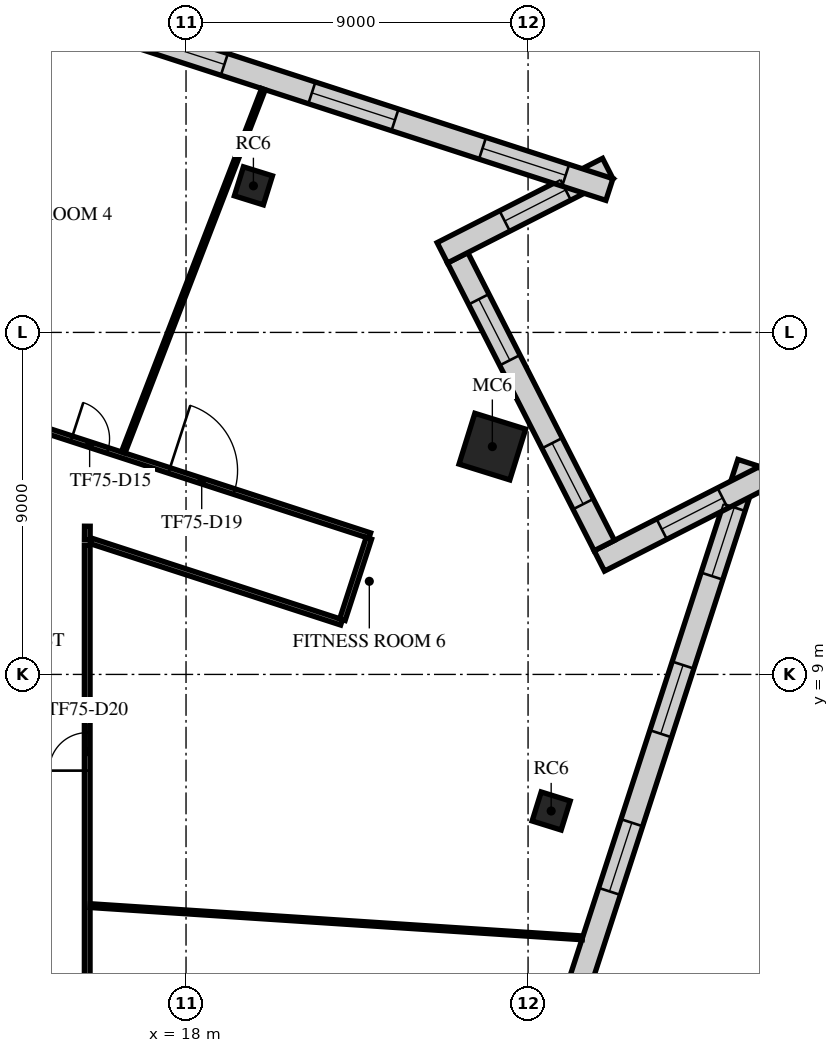
"""IFC4 building model, lengths in metres.
Left out: names, types, materials, properties, quantities, classifications, styles, units other than length and angle.
Written with IfcOpenShell. Run it as: python <this file> out.ifc"""

import sys

from ifc_helpers import new_model, si_unit, direction, frame, frame_2d, origin, origin_2d, place, context, subcontext, project, spatial, rectangle, extrude, element, fill, save


model = new_model("IFC4")
c1 = context("Model", 3, precision=1e-05, world=origin(), true_north=direction((0.0, 1.0)))
c2 = subcontext(c1, "Body", "Model", "MODEL_VIEW")
j1 = project(units=[si_unit("LENGTHUNIT", "METRE"), si_unit("PLANEANGLEUNIT", "RADIAN")], contexts=[c1])
p1 = place(None, origin())
s1 = spatial("IfcSite", under=j1, at=p1, CompositionType="ELEMENT")
p2 = place(p1, origin())
s2 = spatial("IfcBuilding", under=s1, at=p2, CompositionType="ELEMENT")
p3 = place(p2, frame((0.0, 0.0, 316.5)))
s3 = spatial("IfcBuildingStorey", under=s2, at=p3, CompositionType="ELEMENT", Elevation=316.5)
p4 = place(p3, frame((27.608, 5.406, 0.0), z_axis=(0.0, 0.0, 1.0), x_axis=(0.297503182032, 0.954720826567, 0.0)))
e1 = element("IfcColumn", 1, at=p4, inside=s3, PredefinedType="COLUMN", context=c2, shape_type="SweptSolid", body=[
    extrude(rectangle(XDim=0.8, YDim=0.8, at=origin_2d()), origin(), (0.0, 0.0, 1.0), 4.0),
])
p5 = place(p3, frame((26.06, 14.995, 0.0), z_axis=(0.0, 0.0, 1.0), x_axis=(0.297503182032, 0.954720826567, 0.0)))
e2 = element("IfcColumn", 2, at=p5, inside=s3, PredefinedType="COLUMN", context=c2, shape_type="SweptSolid", body=[
    extrude(rectangle(XDim=1.4, YDim=1.4, at=origin_2d()), origin(), (0.0, 0.0, 1.0), 4.0),
])
p6 = place(p3, frame((19.773, 21.857, 0.0), z_axis=(0.0, 0.0, 1.0), x_axis=(0.297503182032, 0.954720826567, 0.0)))
e3 = element("IfcColumn", 3, at=p6, inside=s3, PredefinedType="COLUMN", context=c2, shape_type="SweptSolid", body=[
    extrude(rectangle(XDim=0.8, YDim=0.8, at=origin_2d()), origin(), (0.0, 0.0, 1.0), 4.0),
])
p7 = place(p3, frame((17.98, -31.066, 0.0), z_axis=(0.0, 0.0, 1.0), x_axis=(0.30901795675, 0.9510562036, 0.0)))
e4 = element("IfcWall", 4, at=p7, inside=s3, PredefinedType="STANDARD", context=c2, shape_type="SweptSolid", body=[
    extrude(rectangle(XDim=47.979, YDim=0.6, at=frame_2d((23.99, 0.0))), origin(), (0.0, 0.0, 1.0), 3.65),
])
p8 = place(p7, frame((1.231, 0.0, 0.9)))
e5 = element("IfcOpeningElement", 5, at=p8, cuts=e4, PredefinedType="OPENING", context=c2, shape_type="SweptSolid", body=[
    extrude(rectangle(XDim=1.9, YDim=2.1, at=frame_2d((0.95, 1.05))), frame((0.0, 0.31, 0.0), z_axis=(0.0, -1.0, 0.0), x_axis=(1.0, 0.0, 0.0)), (0.0, 0.0, 1.0), 0.62),
])
p9 = place(p7, frame((5.593, 0.0, 0.9)))
e6 = element("IfcOpeningElement", 6, at=p9, cuts=e4, PredefinedType="OPENING", context=c2, shape_type="SweptSolid", body=[
    extrude(rectangle(XDim=1.9, YDim=2.1, at=frame_2d((0.95, 1.05))), frame((0.0, 0.31, 0.0), z_axis=(0.0, -1.0, 0.0), x_axis=(1.0, 0.0, 0.0)), (0.0, 0.0, 1.0), 0.62),
])
p10 = place(p7, frame((9.954, 0.0, 0.9)))
e7 = element("IfcOpeningElement", 7, at=p10, cuts=e4, PredefinedType="OPENING", context=c2, shape_type="SweptSolid", body=[
    extrude(rectangle(XDim=1.9, YDim=2.1, at=frame_2d((0.95, 1.05))), frame((0.0, 0.31, 0.0), z_axis=(0.0, -1.0, 0.0), x_axis=(1.0, 0.0, 0.0)), (0.0, 0.0, 1.0), 0.62),
])
p11 = place(p7, frame((14.316, 0.0, 0.9)))
e8 = element("IfcOpeningElement", 8, at=p11, cuts=e4, PredefinedType="OPENING", context=c2, shape_type="SweptSolid", body=[
    extrude(rectangle(XDim=1.9, YDim=2.1, at=frame_2d((0.95, 1.05))), frame((0.0, 0.31, 0.0), z_axis=(0.0, -1.0, 0.0), x_axis=(1.0, 0.0, 0.0)), (0.0, 0.0, 1.0), 0.62),
])
p12 = place(p7, frame((18.678, 0.0, 0.9)))
e9 = element("IfcOpeningElement", 9, at=p12, cuts=e4, PredefinedType="OPENING", context=c2, shape_type="SweptSolid", body=[
    extrude(rectangle(XDim=1.9, YDim=2.1, at=frame_2d((0.95, 1.05))), frame((0.0, 0.31, 0.0), z_axis=(0.0, -1.0, 0.0), x_axis=(1.0, 0.0, 0.0)), (0.0, 0.0, 1.0), 0.62),
])
p13 = place(p7, frame((23.04, 0.0, 0.9)))
e10 = element("IfcOpeningElement", 10, at=p13, cuts=e4, PredefinedType="OPENING", context=c2, shape_type="SweptSolid", body=[
    extrude(rectangle(XDim=1.9, YDim=2.1, at=frame_2d((0.95, 1.05))), frame((0.0, 0.31, 0.0), z_axis=(0.0, -1.0, 0.0), x_axis=(1.0, 0.0, 0.0)), (0.0, 0.0, 1.0), 0.62),
])
p14 = place(p7, frame((27.401, 0.0, 0.9)))
e11 = element("IfcOpeningElement", 11, at=p14, cuts=e4, PredefinedType="OPENING", context=c2, shape_type="SweptSolid", body=[
    extrude(rectangle(XDim=1.9, YDim=2.1, at=frame_2d((0.95, 1.05))), frame((0.0, 0.31, 0.0), z_axis=(0.0, -1.0, 0.0), x_axis=(1.0, 0.0, 0.0)), (0.0, 0.0, 1.0), 0.62),
])
p15 = place(p7, frame((31.763, 0.0, 0.9)))
e12 = element("IfcOpeningElement", 12, at=p15, cuts=e4, PredefinedType="OPENING", context=c2, shape_type="SweptSolid", body=[
    extrude(rectangle(XDim=1.9, YDim=2.1, at=frame_2d((0.95, 1.05))), frame((0.0, 0.31, 0.0), z_axis=(0.0, -1.0, 0.0), x_axis=(1.0, 0.0, 0.0)), (0.0, 0.0, 1.0), 0.62),
])
p16 = place(p7, frame((36.125, 0.0, 0.9)))
e13 = element("IfcOpeningElement", 13, at=p16, cuts=e4, PredefinedType="OPENING", context=c2, shape_type="SweptSolid", body=[
    extrude(rectangle(XDim=1.9, YDim=2.1, at=frame_2d((0.95, 1.05))), frame((0.0, 0.31, 0.0), z_axis=(0.0, -1.0, 0.0), x_axis=(1.0, 0.0, 0.0)), (0.0, 0.0, 1.0), 0.62),
])
p17 = place(p7, frame((40.487, 0.0, 0.9)))
e14 = element("IfcOpeningElement", 14, at=p17, cuts=e4, PredefinedType="OPENING", context=c2, shape_type="SweptSolid", body=[
    extrude(rectangle(XDim=1.9, YDim=2.1, at=frame_2d((0.95, 1.05))), frame((0.0, 0.31, 0.0), z_axis=(0.0, -1.0, 0.0), x_axis=(1.0, 0.0, 0.0)), (0.0, 0.0, 1.0), 0.62),
])
p18 = place(p7, frame((44.848, 0.0, 0.9)))
e15 = element("IfcOpeningElement", 15, at=p18, cuts=e4, PredefinedType="OPENING", context=c2, shape_type="SweptSolid", body=[
    extrude(rectangle(XDim=1.9, YDim=2.1, at=frame_2d((0.95, 1.05))), frame((0.0, 0.31, 0.0), z_axis=(0.0, -1.0, 0.0), x_axis=(1.0, 0.0, 0.0)), (0.0, 0.0, 1.0), 0.62),
])
p19 = place(p3, frame((33.228, 14.205, 0.0), z_axis=(0.0, 0.0, 1.0), x_axis=(-0.891013179829, -0.453977437073, 0.0)))
e16 = element("IfcWall", 16, at=p19, inside=s3, PredefinedType="STANDARD", context=c2, shape_type="SweptSolid", body=[
    extrude(rectangle(XDim=4.885, YDim=0.6, at=frame_2d((2.443, 0.0))), origin(), (0.0, 0.0, 1.0), 3.65),
])
p20 = place(p19, frame((1.243, 0.0, 0.9)))
e17 = element("IfcOpeningElement", 17, at=p20, cuts=e16, PredefinedType="OPENING", context=c2, shape_type="SweptSolid", body=[
    extrude(rectangle(XDim=1.8, YDim=2.1, at=frame_2d((0.9, 1.05))), frame((0.0, 0.31, 0.0), z_axis=(0.0, -1.0, 0.0), x_axis=(1.0, 0.0, 0.0)), (0.0, 0.0, 1.0), 0.62),
])
p21 = place(p3, frame((29.006, 12.39, 0.0), z_axis=(0.0, 0.0, 1.0), x_axis=(-0.453979132966, 0.891012315758, 0.0)))
e18 = element("IfcWall", 18, at=p21, inside=s3, PredefinedType="STANDARD", context=c2, shape_type="SweptSolid", body=[
    extrude(rectangle(XDim=8.5, YDim=0.6, at=frame_2d((4.25, 0.0))), origin(), (0.0, 0.0, 1.0), 3.65),
])
p22 = place(p21, frame((1.225, 0.0, 0.9)))
e19 = element("IfcOpeningElement", 19, at=p22, cuts=e18, PredefinedType="OPENING", context=c2, shape_type="SweptSolid", body=[
    extrude(rectangle(XDim=1.8, YDim=2.1, at=frame_2d((0.9, 1.05))), frame((0.0, 0.31, 0.0), z_axis=(0.0, -1.0, 0.0), x_axis=(1.0, 0.0, 0.0)), (0.0, 0.0, 1.0), 0.62),
])
p23 = place(p21, frame((5.475, 0.0, 0.9)))
e20 = element("IfcOpeningElement", 20, at=p23, cuts=e18, PredefinedType="OPENING", context=c2, shape_type="SweptSolid", body=[
    extrude(rectangle(XDim=1.8, YDim=2.1, at=frame_2d((0.9, 1.05))), frame((0.0, 0.31, 0.0), z_axis=(0.0, -1.0, 0.0), x_axis=(1.0, 0.0, 0.0)), (0.0, 0.0, 1.0), 0.62),
])
p24 = place(p3, frame((24.744, 20.095, 0.0), z_axis=(0.0, 0.0, 1.0), x_axis=(0.891003264926, 0.453996896346, 0.0)))
e21 = element("IfcWall", 21, at=p24, inside=s3, PredefinedType="STANDARD", context=c2, shape_type="SweptSolid", body=[
    extrude(rectangle(XDim=4.885, YDim=0.6, at=frame_2d((2.443, 0.0))), origin(), (0.0, 0.0, 1.0), 3.65),
])
p25 = place(p24, frame((1.843, 0.0, 0.9)))
e22 = element("IfcOpeningElement", 22, at=p25, cuts=e21, PredefinedType="OPENING", context=c2, shape_type="SweptSolid", body=[
    extrude(rectangle(XDim=1.8, YDim=2.1, at=frame_2d((0.9, 1.05))), frame((0.0, 0.31, 0.0), z_axis=(0.0, -1.0, 0.0), x_axis=(1.0, 0.0, 0.0)), (0.0, 0.0, 1.0), 0.62),
])
p26 = place(p3, frame((29.14, 21.76, 0.0), z_axis=(0.0, 0.0, 1.0), x_axis=(-0.951057712071, 0.309013314132, 0.0)))
e23 = element("IfcWall", 23, at=p26, inside=s3, PredefinedType="STANDARD", context=c2, shape_type="SweptSolid", body=[
    extrude(rectangle(XDim=42.49, YDim=0.6, at=frame_2d((21.245, 0.0))), origin(), (0.0, 0.0, 1.0), 3.65),
])
p27 = place(p26, frame((1.21, 0.0, 0.9)))
e24 = element("IfcOpeningElement", 24, at=p27, cuts=e23, PredefinedType="OPENING", context=c2, shape_type="SweptSolid", body=[
    extrude(rectangle(XDim=2.3, YDim=2.1, at=frame_2d((1.15, 1.05))), frame((0.0, 0.31, 0.0), z_axis=(0.0, -1.0, 0.0), x_axis=(1.0, 0.0, 0.0)), (0.0, 0.0, 1.0), 0.62),
])
p28 = place(p26, frame((5.932, 0.0, 0.9)))
e25 = element("IfcOpeningElement", 25, at=p28, cuts=e23, PredefinedType="OPENING", context=c2, shape_type="SweptSolid", body=[
    extrude(rectangle(XDim=2.3, YDim=2.1, at=frame_2d((1.15, 1.05))), frame((0.0, 0.31, 0.0), z_axis=(0.0, -1.0, 0.0), x_axis=(1.0, 0.0, 0.0)), (0.0, 0.0, 1.0), 0.62),
])
p29 = place(p26, frame((10.653, 0.0, 0.9)))
e26 = element("IfcOpeningElement", 26, at=p29, cuts=e23, PredefinedType="OPENING", context=c2, shape_type="SweptSolid", body=[
    extrude(rectangle(XDim=2.3, YDim=2.1, at=frame_2d((1.15, 1.05))), frame((0.0, 0.31, 0.0), z_axis=(0.0, -1.0, 0.0), x_axis=(1.0, 0.0, 0.0)), (0.0, 0.0, 1.0), 0.62),
])
p30 = place(p26, frame((15.374, 0.0, 0.9)))
e27 = element("IfcOpeningElement", 27, at=p30, cuts=e23, PredefinedType="OPENING", context=c2, shape_type="SweptSolid", body=[
    extrude(rectangle(XDim=2.3, YDim=2.1, at=frame_2d((1.15, 1.05))), frame((0.0, 0.31, 0.0), z_axis=(0.0, -1.0, 0.0), x_axis=(1.0, 0.0, 0.0)), (0.0, 0.0, 1.0), 0.62),
])
p31 = place(p26, frame((20.095, 0.0, 0.9)))
e28 = element("IfcOpeningElement", 28, at=p31, cuts=e23, PredefinedType="OPENING", context=c2, shape_type="SweptSolid", body=[
    extrude(rectangle(XDim=2.3, YDim=2.1, at=frame_2d((1.15, 1.05))), frame((0.0, 0.31, 0.0), z_axis=(0.0, -1.0, 0.0), x_axis=(1.0, 0.0, 0.0)), (0.0, 0.0, 1.0), 0.62),
])
p32 = place(p26, frame((24.816, 0.0, 0.9)))
e29 = element("IfcOpeningElement", 29, at=p32, cuts=e23, PredefinedType="OPENING", context=c2, shape_type="SweptSolid", body=[
    extrude(rectangle(XDim=2.3, YDim=2.1, at=frame_2d((1.15, 1.05))), frame((0.0, 0.31, 0.0), z_axis=(0.0, -1.0, 0.0), x_axis=(1.0, 0.0, 0.0)), (0.0, 0.0, 1.0), 0.62),
])
p33 = place(p26, frame((29.537, 0.0, 0.9)))
e30 = element("IfcOpeningElement", 30, at=p33, cuts=e23, PredefinedType="OPENING", context=c2, shape_type="SweptSolid", body=[
    extrude(rectangle(XDim=2.3, YDim=2.1, at=frame_2d((1.15, 1.05))), frame((0.0, 0.31, 0.0), z_axis=(0.0, -1.0, 0.0), x_axis=(1.0, 0.0, 0.0)), (0.0, 0.0, 1.0), 0.62),
])
p34 = place(p26, frame((34.258, 0.0, 0.9)))
e31 = element("IfcOpeningElement", 31, at=p34, cuts=e23, PredefinedType="OPENING", context=c2, shape_type="SweptSolid", body=[
    extrude(rectangle(XDim=2.3, YDim=2.1, at=frame_2d((1.15, 1.05))), frame((0.0, 0.31, 0.0), z_axis=(0.0, -1.0, 0.0), x_axis=(1.0, 0.0, 0.0)), (0.0, 0.0, 1.0), 0.62),
])
p35 = place(p26, frame((38.979, 0.0, 0.9)))
e32 = element("IfcOpeningElement", 32, at=p35, cuts=e23, PredefinedType="OPENING", context=c2, shape_type="SweptSolid", body=[
    extrude(rectangle(XDim=2.3, YDim=2.1, at=frame_2d((1.15, 1.05))), frame((0.0, 0.31, 0.0), z_axis=(0.0, -1.0, 0.0), x_axis=(1.0, 0.0, 0.0)), (0.0, 0.0, 1.0), 0.62),
])
p36 = place(p3, frame((-10.964, 23.635, 0.0), z_axis=(0.0, 0.0, 1.0), x_axis=(0.951055018443, -0.309021604252, 0.0)))
e33 = element("IfcWall", 33, at=p36, inside=s3, PredefinedType="PARTITIONING", context=c2, shape_type="SweptSolid", body=[
    extrude(rectangle(XDim=35.537, YDim=0.15, at=frame_2d((17.769, 0.0))), origin(), (0.0, 0.0, 1.0), 3.25),
])
p37 = place(p36, frame((9.554, 0.0, 0.0)))
e34 = element("IfcOpeningElement", 34, at=p37, cuts=e33, PredefinedType="OPENING", context=c2, shape_type="SweptSolid", body=[
    extrude(rectangle(XDim=1.0, YDim=2.1, at=frame_2d((0.5, 1.05))), frame((0.0, 0.085, 0.0), z_axis=(0.0, -1.0, 0.0), x_axis=(1.0, 0.0, 0.0)), (0.0, 0.0, 1.0), 0.17),
])
p38 = place(p36, frame((14.629, 0.0, 0.0)))
e35 = element("IfcOpeningElement", 35, at=p38, cuts=e33, PredefinedType="OPENING", context=c2, shape_type="SweptSolid", body=[
    extrude(rectangle(XDim=1.0, YDim=2.1, at=frame_2d((0.5, 1.05))), frame((0.0, 0.085, 0.0), z_axis=(0.0, -1.0, 0.0), x_axis=(1.0, 0.0, 0.0)), (0.0, 0.0, 1.0), 0.17),
])
p39 = place(p36, frame((27.287, 0.0, 0.0)))
e36 = element("IfcOpeningElement", 36, at=p39, cuts=e33, PredefinedType="OPENING", context=c2, shape_type="SweptSolid", body=[
    extrude(rectangle(XDim=1.0, YDim=2.1, at=frame_2d((0.5, 1.05))), frame((0.0, 0.085, 0.0), z_axis=(0.0, -1.0, 0.0), x_axis=(1.0, 0.0, 0.0)), (0.0, 0.0, 1.0), 0.17),
])
p40 = place(p36, frame((29.988, 0.0, 0.0)))
e37 = element("IfcOpeningElement", 37, at=p40, cuts=e33, PredefinedType="OPENING", context=c2, shape_type="SweptSolid", body=[
    extrude(rectangle(XDim=1.8, YDim=2.1, at=frame_2d((0.9, 1.05))), frame((0.0, 0.085, 0.0), z_axis=(0.0, -1.0, 0.0), x_axis=(1.0, 0.0, 0.0)), (0.0, 0.0, 1.0), 0.17),
])
p41 = place(p3, frame((15.4, -15.325, 0.0), z_axis=(0.0, 0.0, 1.0), x_axis=(0.0, 1.0, 0.0)))
e38 = element("IfcWall", 38, at=p41, inside=s3, PredefinedType="PARTITIONING", context=c2, shape_type="SweptSolid", body=[
    extrude(rectangle(XDim=27.724, YDim=0.15, at=frame_2d((13.862, 0.0))), origin(), (0.0, 0.0, 1.0), 3.25),
])
p42 = place(p41, frame((6.3, 0.0, 0.0)))
e39 = element("IfcOpeningElement", 39, at=p42, cuts=e38, PredefinedType="OPENING", context=c2, shape_type="SweptSolid", body=[
    extrude(rectangle(XDim=1.0, YDim=2.1, at=frame_2d((0.5, 1.05))), frame((0.0, 0.085, 0.0), z_axis=(0.0, -1.0, 0.0), x_axis=(1.0, 0.0, 0.0)), (0.0, 0.0, 1.0), 0.17),
])
p43 = place(p41, frame((8.911, 0.0, 0.0)))
e40 = element("IfcOpeningElement", 40, at=p43, cuts=e38, PredefinedType="OPENING", context=c2, shape_type="SweptSolid", body=[
    extrude(rectangle(XDim=1.0, YDim=2.1, at=frame_2d((0.5, 1.05))), frame((0.0, 0.085, 0.0), z_axis=(0.0, -1.0, 0.0), x_axis=(1.0, 0.0, 0.0)), (0.0, 0.0, 1.0), 0.17),
])
p44 = place(p41, frame((21.793, 0.0, 0.0)))
e41 = element("IfcOpeningElement", 41, at=p44, cuts=e38, PredefinedType="OPENING", context=c2, shape_type="SweptSolid", body=[
    extrude(rectangle(XDim=1.0, YDim=2.1, at=frame_2d((0.5, 1.05))), frame((0.0, 0.085, 0.0), z_axis=(0.0, -1.0, 0.0), x_axis=(1.0, 0.0, 0.0)), (0.0, 0.0, 1.0), 0.17),
])
p45 = place(p3, frame((15.403, 12.9, 0.0), z_axis=(0.0, 0.0, 1.0), x_axis=(-0.006877416439, -0.999976350292, 0.0)))
e42 = element("IfcWall", 42, at=p45, inside=s3, PredefinedType="PARTITIONING", context=c2, shape_type="SweptSolid", body=[
    extrude(rectangle(XDim=0.355, YDim=0.15, at=frame_2d((0.177, 0.0))), origin(), (0.0, 0.0, 1.0), 3.25),
])
p46 = place(p3, frame((15.499, 12.513, 0.0), z_axis=(0.0, 0.0, 1.0), x_axis=(0.951067964753, -0.308981757424, 0.0)))
e43 = element("IfcWall", 43, at=p46, inside=s3, PredefinedType="PARTITIONING", context=c2, shape_type="SweptSolid", body=[
    extrude(rectangle(XDim=6.933, YDim=0.15, at=frame_2d((3.466, 0.0))), origin(), (0.0, 0.0, 1.0), 3.25),
])
p47 = place(p3, frame((22.115, 10.442, 0.0), z_axis=(0.0, 0.0, 1.0), x_axis=(0.309186681348, 0.951001364919, 0.0)))
e44 = element("IfcWall", 44, at=p47, inside=s3, PredefinedType="PARTITIONING", context=c2, shape_type="SweptSolid", body=[
    extrude(rectangle(XDim=2.25, YDim=0.15, at=frame_2d((1.125, 0.0))), origin(), (0.0, 0.0, 1.0), 3.25),
])
p48 = place(p3, frame((15.478, 2.916, 0.0), z_axis=(0.0, 0.0, 1.0), x_axis=(0.99786091406, -0.065372748079, 0.0)))
e45 = element("IfcWall", 45, at=p48, inside=s3, PredefinedType="PARTITIONING", context=c2, shape_type="SweptSolid", body=[
    extrude(rectangle(XDim=12.978, YDim=0.1, at=frame_2d((6.489, 0.0))), origin(), (0.0, 0.0, 1.0), 3.05),
])
p49 = place(p3, frame((16.348, 14.843, 0.0), z_axis=(0.0, 0.0, 1.0), x_axis=(0.360002455437, 0.932951355687, 0.0)))
e46 = element("IfcWall", 46, at=p49, inside=s3, PredefinedType="PARTITIONING", context=c2, shape_type="SweptSolid", body=[
    extrude(rectangle(XDim=10.245, YDim=0.1, at=frame_2d((5.123, 0.0))), origin(), (0.0, 0.0, 1.0), 3.05),
])
p50 = place(p16, origin())
e47 = element("IfcWindow", 47, at=p50, inside=s3, PartitioningType="SINGLE_PANEL", PredefinedType="WINDOW", context=c2, shape_type="SweptSolid", body=[
    extrude(rectangle(XDim=1.9, YDim=2.1, at=frame_2d((0.95, 1.05))), frame((0.0, 0.03, 0.0), z_axis=(0.0, -1.0, 0.0), x_axis=(1.0, 0.0, 0.0)), (0.0, 0.0, 1.0), 0.06),
])
fill(e13, e47)
p51 = place(p17, origin())
e48 = element("IfcWindow", 48, at=p51, inside=s3, PartitioningType="SINGLE_PANEL", PredefinedType="WINDOW", context=c2, shape_type="SweptSolid", body=[
    extrude(rectangle(XDim=1.9, YDim=2.1, at=frame_2d((0.95, 1.05))), frame((0.0, 0.03, 0.0), z_axis=(0.0, -1.0, 0.0), x_axis=(1.0, 0.0, 0.0)), (0.0, 0.0, 1.0), 0.06),
])
fill(e14, e48)
p52 = place(p18, origin())
e49 = element("IfcWindow", 49, at=p52, inside=s3, PartitioningType="SINGLE_PANEL", PredefinedType="WINDOW", context=c2, shape_type="SweptSolid", body=[
    extrude(rectangle(XDim=1.9, YDim=2.1, at=frame_2d((0.95, 1.05))), frame((0.0, 0.03, 0.0), z_axis=(0.0, -1.0, 0.0), x_axis=(1.0, 0.0, 0.0)), (0.0, 0.0, 1.0), 0.06),
])
fill(e15, e49)
p53 = place(p20, origin())
e50 = element("IfcWindow", 50, at=p53, inside=s3, PartitioningType="SINGLE_PANEL", PredefinedType="WINDOW", context=c2, shape_type="SweptSolid", body=[
    extrude(rectangle(XDim=1.8, YDim=2.1, at=frame_2d((0.9, 1.05))), frame((0.0, 0.03, 0.0), z_axis=(0.0, -1.0, 0.0), x_axis=(1.0, 0.0, 0.0)), (0.0, 0.0, 1.0), 0.06),
])
fill(e17, e50)
p54 = place(p22, origin())
e51 = element("IfcWindow", 51, at=p54, inside=s3, PartitioningType="SINGLE_PANEL", PredefinedType="WINDOW", context=c2, shape_type="SweptSolid", body=[
    extrude(rectangle(XDim=1.8, YDim=2.1, at=frame_2d((0.9, 1.05))), frame((0.0, 0.03, 0.0), z_axis=(0.0, -1.0, 0.0), x_axis=(1.0, 0.0, 0.0)), (0.0, 0.0, 1.0), 0.06),
])
fill(e19, e51)
p55 = place(p23, origin())
e52 = element("IfcWindow", 52, at=p55, inside=s3, PartitioningType="SINGLE_PANEL", PredefinedType="WINDOW", context=c2, shape_type="SweptSolid", body=[
    extrude(rectangle(XDim=1.8, YDim=2.1, at=frame_2d((0.9, 1.05))), frame((0.0, 0.03, 0.0), z_axis=(0.0, -1.0, 0.0), x_axis=(1.0, 0.0, 0.0)), (0.0, 0.0, 1.0), 0.06),
])
fill(e20, e52)
p56 = place(p25, origin())
e53 = element("IfcWindow", 53, at=p56, inside=s3, PartitioningType="SINGLE_PANEL", PredefinedType="WINDOW", context=c2, shape_type="SweptSolid", body=[
    extrude(rectangle(XDim=1.8, YDim=2.1, at=frame_2d((0.9, 1.05))), frame((0.0, 0.03, 0.0), z_axis=(0.0, -1.0, 0.0), x_axis=(1.0, 0.0, 0.0)), (0.0, 0.0, 1.0), 0.06),
])
fill(e22, e53)
p57 = place(p27, origin())
e54 = element("IfcWindow", 54, at=p57, inside=s3, PartitioningType="SINGLE_PANEL", PredefinedType="WINDOW", context=c2, shape_type="SweptSolid", body=[
    extrude(rectangle(XDim=2.3, YDim=2.1, at=frame_2d((1.15, 1.05))), frame((0.0, 0.03, 0.0), z_axis=(0.0, -1.0, 0.0), x_axis=(1.0, 0.0, 0.0)), (0.0, 0.0, 1.0), 0.06),
])
fill(e24, e54)
p58 = place(p28, origin())
e55 = element("IfcWindow", 55, at=p58, inside=s3, PartitioningType="SINGLE_PANEL", PredefinedType="WINDOW", context=c2, shape_type="SweptSolid", body=[
    extrude(rectangle(XDim=2.3, YDim=2.1, at=frame_2d((1.15, 1.05))), frame((0.0, 0.03, 0.0), z_axis=(0.0, -1.0, 0.0), x_axis=(1.0, 0.0, 0.0)), (0.0, 0.0, 1.0), 0.06),
])
fill(e25, e55)
p59 = place(p29, origin())
e56 = element("IfcWindow", 56, at=p59, inside=s3, PartitioningType="SINGLE_PANEL", PredefinedType="WINDOW", context=c2, shape_type="SweptSolid", body=[
    extrude(rectangle(XDim=2.3, YDim=2.1, at=frame_2d((1.15, 1.05))), frame((0.0, 0.03, 0.0), z_axis=(0.0, -1.0, 0.0), x_axis=(1.0, 0.0, 0.0)), (0.0, 0.0, 1.0), 0.06),
])
fill(e26, e56)
p60 = place(p39, origin())
e57 = element("IfcDoor", 57, at=p60, inside=s3, OperationType="SINGLE_SWING_LEFT", PredefinedType="DOOR", context=c2, shape_type="SweptSolid", body=[
    extrude(rectangle(XDim=1.0, YDim=2.1, at=frame_2d((0.5, 1.05))), frame((0.0, 0.025, 0.0), z_axis=(0.0, -1.0, 0.0), x_axis=(1.0, 0.0, 0.0)), (0.0, 0.0, 1.0), 0.05),
])
fill(e36, e57)
p61 = place(p40, origin())
e58 = element("IfcDoor", 58, at=p61, inside=s3, OperationType="DOUBLE_DOOR_SINGLE_SWING", PredefinedType="DOOR", context=c2, shape_type="SweptSolid", body=[
    extrude(rectangle(XDim=1.8, YDim=2.1, at=frame_2d((0.9, 1.05))), frame((0.0, 0.025, 0.0), z_axis=(0.0, -1.0, 0.0), x_axis=(1.0, 0.0, 0.0)), (0.0, 0.0, 1.0), 0.05),
])
fill(e37, e58)
p62 = place(p44, frame((1.0, 0.0, 0.0), z_axis=(0.0, 0.0, 1.0), x_axis=(-1.0, 0.0, 0.0)))
e59 = element("IfcDoor", 59, at=p62, inside=s3, OperationType="SINGLE_SWING_RIGHT", PredefinedType="DOOR", context=c2, shape_type="SweptSolid", body=[
    extrude(rectangle(XDim=1.0, YDim=2.1, at=frame_2d((0.5, 1.05))), frame((0.0, 0.025, 0.0), z_axis=(0.0, -1.0, 0.0), x_axis=(1.0, 0.0, 0.0)), (0.0, 0.0, 1.0), 0.05),
])
fill(e41, e59)
save(model, sys.argv[1])
